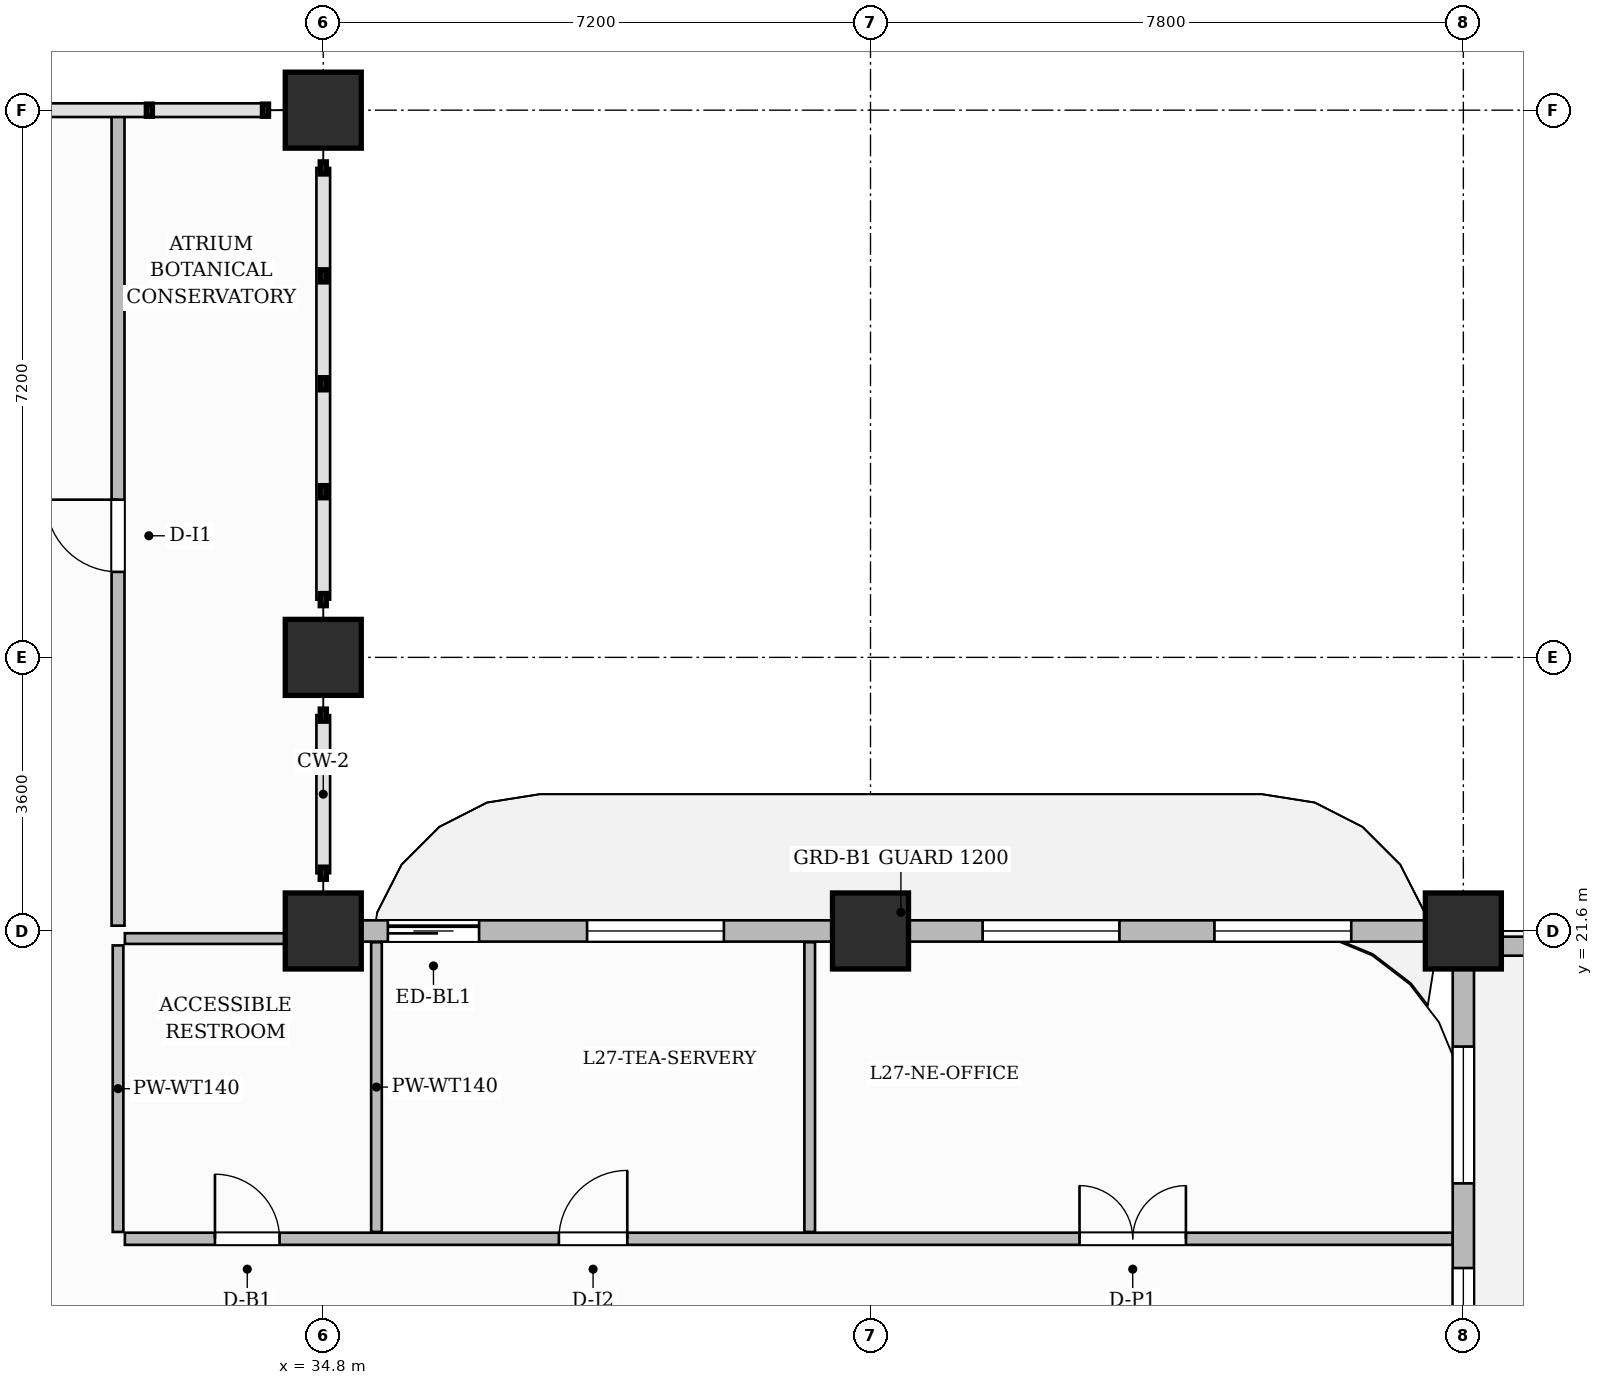
"""IFC4 building model, lengths in metres.
Left out: names, types, materials, properties, quantities, classifications, styles, units other than length and angle.
Written with IfcOpenShell. Run it as: python <this file> out.ifc"""

import sys

from ifc_helpers import new_model, si_unit, direction, frame, frame_2d, origin, origin_2d, place, context, subcontext, project, spatial, rectangle, extrude, source, transform, mapped, element, fill, save


model = new_model("IFC4")
c1 = context("Model", 3, precision=1e-05, world=origin(), true_north=direction((0.0, 1.0)))
c2 = subcontext(c1, "Body", "Model", "MODEL_VIEW")
j1 = project(units=[si_unit("LENGTHUNIT", "METRE"), si_unit("PLANEANGLEUNIT", "RADIAN")], contexts=[c1])
p1 = place(None, origin())
s1 = spatial("IfcSite", under=j1, at=p1, CompositionType="ELEMENT")
p2 = place(p1, origin())
s2 = spatial("IfcBuilding", under=s1, at=p2, CompositionType="ELEMENT")
p3 = place(p2, frame((0.0, 0.0, 111.8)))
s3 = spatial("IfcBuildingStorey", under=s2, at=p3, CompositionType="ELEMENT", Elevation=111.8)
m1 = source(origin(), c2, "Body", "SweptSolid", [
    extrude(rectangle(XDim=1.0, YDim=1.0, at=origin_2d()), origin(), (0.0, 0.0, 1.0), 3.7),
])
for number, where, z_axis, x_axis in (
    (1, (34.8, 21.6, 0.0), (0.0, 0.0, 1.0), (1.0, 0.0, 0.0)),
    (2, (34.8, 25.2, 0.0), (0.0, 0.0, 1.0), (1.0, 0.0, 0.0)),
    (3, (34.8, 32.4, 0.0), (0.0, 0.0, 1.0), (1.0, 0.0, 0.0)),
    (4, (42.0, 21.6, 0.0), (0.0, 0.0, 1.0), (1.0, 0.0, 0.0)),
    (5, (49.8, 21.6, 0.0), (0.0, 0.0, 1.0), (1.0, 0.0, 0.0)),
):
    element("IfcColumn", number, at=place(p3, frame(where, z_axis=z_axis, x_axis=x_axis)), inside=s3, PredefinedType="COLUMN", context=c2, shape_type="MappedRepresentation", body=[
        mapped(m1, transform((0.0, 0.0, 0.0), scale=1.0)),
    ])
p4 = place(p3, frame((32.19, 17.55, 0.0), z_axis=(0.0, 0.0, 1.0), x_axis=(1.0, 0.0, 0.0)))
e6 = element("IfcWall", 6, at=p4, inside=s3, PredefinedType="PARTITIONING", context=c2, shape_type="SweptSolid", body=[
    extrude(rectangle(XDim=17.47, YDim=0.16, at=frame_2d((8.735, 0.0))), origin(), (0.0, 0.0, 1.0), 3.45),
])
p5 = place(p4, frame((1.185, 0.0, 0.0)))
e7 = element("IfcOpeningElement", 7, at=p5, cuts=e6, PredefinedType="OPENING", context=c2, shape_type="SweptSolid", body=[
    extrude(rectangle(XDim=0.85, YDim=2.1, at=frame_2d((0.425, 1.05))), frame((0.0, 0.09, 0.0), z_axis=(0.0, -1.0, 0.0), x_axis=(1.0, 0.0, 0.0)), (0.0, 0.0, 1.0), 0.18),
])
p6 = place(p4, frame((5.71, 0.0, 0.0)))
e8 = element("IfcOpeningElement", 8, at=p6, cuts=e6, PredefinedType="OPENING", context=c2, shape_type="SweptSolid", body=[
    extrude(rectangle(XDim=0.9, YDim=2.15, at=frame_2d((0.45, 1.075))), frame((0.0, 0.09, 0.0), z_axis=(0.0, -1.0, 0.0), x_axis=(1.0, 0.0, 0.0)), (0.0, 0.0, 1.0), 0.18),
])
p7 = place(p4, frame((12.56, 0.0, 0.0)))
e9 = element("IfcOpeningElement", 9, at=p7, cuts=e6, PredefinedType="OPENING", context=c2, shape_type="SweptSolid", body=[
    extrude(rectangle(XDim=1.4, YDim=2.35, at=frame_2d((0.7, 1.175))), frame((0.0, 0.09, 0.0), z_axis=(0.0, -1.0, 0.0), x_axis=(1.0, 0.0, 0.0)), (0.0, 0.0, 1.0), 0.18),
])
p8 = place(p3, frame((32.1, 17.64, 0.0), z_axis=(0.0, 0.0, 1.0), x_axis=(0.0, 1.0, 0.0)))
e10 = element("IfcWall", 10, at=p8, inside=s3, PredefinedType="PARTITIONING", context=c2, shape_type="SweptSolid", body=[
    extrude(rectangle(XDim=3.77, YDim=0.14, at=frame_2d((1.885, 0.0))), origin(), (0.0, 0.0, 1.0), 3.45),
])
for number, where, z_axis, x_axis in (
    (11, (35.5, 17.64, 0.0), (0.0, 0.0, 1.0), (0.0, 1.0, 0.0)),
    (12, (41.2, 17.64, 0.0), (0.0, 0.0, 1.0), (0.0, 1.0, 0.0)),
):
    element("IfcWall", number, at=place(p3, frame(where, z_axis=z_axis, x_axis=x_axis)), inside=s3, PredefinedType="PARTITIONING", context=c2, shape_type="SweptSolid", body=[
        extrude(rectangle(XDim=3.812, YDim=0.14, at=frame_2d((1.906, 0.0))), origin(), (0.0, 0.0, 1.0), 3.45),
    ])
p9 = place(p3, frame((32.19, 21.5, 0.0), z_axis=(0.0, 0.0, 1.0), x_axis=(1.0, 0.0, 0.0)))
e13 = element("IfcWall", 13, at=p9, inside=s3, PredefinedType="PARTITIONING", context=c2, shape_type="SweptSolid", body=[
    extrude(rectangle(XDim=2.42, YDim=0.14, at=frame_2d((1.21, 0.0))), origin(), (0.0, 0.0, 1.0), 2.935),
])
p10 = place(p3, frame((32.1, 21.67, 0.0), z_axis=(0.0, 0.0, 1.0), x_axis=(0.0, 1.0, 0.0)))
e14 = element("IfcWall", 14, at=p10, inside=s3, PredefinedType="PARTITIONING", context=c2, shape_type="SweptSolid", body=[
    extrude(rectangle(XDim=10.702, YDim=0.17, at=frame_2d((5.351, 0.0))), origin(), (0.0, 0.0, 1.0), 3.45),
])
p11 = place(p10, frame((4.655, 0.0, 0.0)))
e15 = element("IfcOpeningElement", 15, at=p11, cuts=e14, PredefinedType="OPENING", context=c2, shape_type="SweptSolid", body=[
    extrude(rectangle(XDim=0.95, YDim=2.15, at=frame_2d((0.475, 1.075))), frame((0.0, 0.095, 0.0), z_axis=(0.0, -1.0, 0.0), x_axis=(1.0, 0.0, 0.0)), (0.0, 0.0, 1.0), 0.19),
])
p12 = place(p3, frame((49.8, 14.62, 0.0), z_axis=(0.0, 0.0, 1.0), x_axis=(0.0, 1.0, 0.0)))
e16 = element("IfcWall", 16, at=p12, inside=s3, PredefinedType="SOLIDWALL", context=c2, shape_type="SweptSolid", body=[
    extrude(rectangle(XDim=6.93, YDim=0.28, at=frame_2d((3.465, 0.0))), origin(), (0.0, 0.0, 1.0), 2.935),
])
p13 = place(p12, frame((0.745, 0.0, 0.8)))
e17 = element("IfcOpeningElement", 17, at=p13, cuts=e16, PredefinedType="OPENING", context=c2, shape_type="SweptSolid", body=[
    extrude(rectangle(XDim=1.8, YDim=1.85, at=frame_2d((0.9, 0.925))), frame((0.0, 0.15, 0.0), z_axis=(0.0, -1.0, 0.0), x_axis=(1.0, 0.0, 0.0)), (0.0, 0.0, 1.0), 0.3),
])
p14 = place(p12, frame((3.659, 0.0, 0.8)))
e18 = element("IfcOpeningElement", 18, at=p14, cuts=e16, PredefinedType="OPENING", context=c2, shape_type="SweptSolid", body=[
    extrude(rectangle(XDim=1.8, YDim=1.85, at=frame_2d((0.9, 0.925))), frame((0.0, 0.15, 0.0), z_axis=(0.0, -1.0, 0.0), x_axis=(1.0, 0.0, 0.0)), (0.0, 0.0, 1.0), 0.3),
])
p15 = place(p3, frame((34.8, 21.6, 0.0), z_axis=(0.0, 0.0, 1.0), x_axis=(1.0, 0.0, 0.0)))
e19 = element("IfcWall", 19, at=p15, inside=s3, PredefinedType="SOLIDWALL", context=c2, shape_type="SweptSolid", body=[
    extrude(rectangle(XDim=15.0, YDim=0.28, at=frame_2d((7.5, 0.0))), origin(), (0.0, 0.0, 1.0), 2.935),
])
p16 = place(p15, frame((0.85, 0.0, 0.0)))
e20 = element("IfcOpeningElement", 20, at=p16, cuts=e19, PredefinedType="OPENING", context=c2, shape_type="SweptSolid", body=[
    extrude(rectangle(XDim=1.2, YDim=2.2, at=frame_2d((0.6, 1.1))), frame((0.0, 0.15, 0.0), z_axis=(0.0, -1.0, 0.0), x_axis=(1.0, 0.0, 0.0)), (0.0, 0.0, 1.0), 0.3),
])
p17 = place(p15, frame((3.471, 0.0, 0.8)))
e21 = element("IfcOpeningElement", 21, at=p17, cuts=e19, PredefinedType="OPENING", context=c2, shape_type="SweptSolid", body=[
    extrude(rectangle(XDim=1.8, YDim=1.85, at=frame_2d((0.9, 0.925))), frame((0.0, 0.15, 0.0), z_axis=(0.0, -1.0, 0.0), x_axis=(1.0, 0.0, 0.0)), (0.0, 0.0, 1.0), 0.3),
])
p18 = place(p15, frame((8.675, 0.0, 0.8)))
e22 = element("IfcOpeningElement", 22, at=p18, cuts=e19, PredefinedType="OPENING", context=c2, shape_type="SweptSolid", body=[
    extrude(rectangle(XDim=1.8, YDim=1.85, at=frame_2d((0.9, 0.925))), frame((0.0, 0.15, 0.0), z_axis=(0.0, -1.0, 0.0), x_axis=(1.0, 0.0, 0.0)), (0.0, 0.0, 1.0), 0.3),
])
p19 = place(p15, frame((11.725, 0.0, 0.8)))
e23 = element("IfcOpeningElement", 23, at=p19, cuts=e19, PredefinedType="OPENING", context=c2, shape_type="SweptSolid", body=[
    extrude(rectangle(XDim=1.8, YDim=1.85, at=frame_2d((0.9, 0.925))), frame((0.0, 0.15, 0.0), z_axis=(0.0, -1.0, 0.0), x_axis=(1.0, 0.0, 0.0)), (0.0, 0.0, 1.0), 0.3),
])
p20 = place(p3, frame((50.06, 21.4, 0.0), z_axis=(0.0, 0.0, 1.0), x_axis=(1.0, 0.0, 0.0)))
e24 = element("IfcWall", 24, at=p20, inside=s3, PredefinedType="PARAPET", context=c2, shape_type="SweptSolid", body=[
    extrude(rectangle(XDim=5.127, YDim=0.25, at=frame_2d((2.563, 0.0))), origin(), (0.0, 0.0, 1.0), 0.95),
])
m2 = source(origin(), c2, "Body", "SweptSolid", [
    extrude(rectangle(XDim=0.85, YDim=2.1, at=frame_2d((0.425, 1.05))), frame((0.0, 0.025, 0.0), z_axis=(0.0, -1.0, 0.0), x_axis=(1.0, 0.0, 0.0)), (0.0, 0.0, 1.0), 0.05),
])
p21 = place(p5, origin())
e25 = element("IfcDoor", 25, at=p21, inside=s3, OperationType="SINGLE_SWING_LEFT", PredefinedType="DOOR", context=c2, shape_type="MappedRepresentation", body=[
    mapped(m2, transform((0.0, 0.0, 0.0), scale=1.0)),
])
fill(e7, e25)
m3 = source(origin(), c2, "Body", "SweptSolid", [
    extrude(rectangle(XDim=0.9, YDim=2.15, at=frame_2d((0.45, 1.075))), frame((0.0, 0.025, 0.0), z_axis=(0.0, -1.0, 0.0), x_axis=(1.0, 0.0, 0.0)), (0.0, 0.0, 1.0), 0.05),
])
p22 = place(p6, origin())
e26 = element("IfcDoor", 26, at=p22, inside=s3, OperationType="SINGLE_SWING_RIGHT", PredefinedType="DOOR", context=c2, shape_type="MappedRepresentation", body=[
    mapped(m3, transform((0.0, 0.0, 0.0), scale=1.0)),
])
fill(e8, e26)
m4 = source(origin(), c2, "Body", "SweptSolid", [
    extrude(rectangle(XDim=1.4, YDim=2.35, at=frame_2d((0.7, 1.175))), frame((0.0, 0.025, 0.0), z_axis=(0.0, -1.0, 0.0), x_axis=(1.0, 0.0, 0.0)), (0.0, 0.0, 1.0), 0.05),
])
p23 = place(p7, origin())
e27 = element("IfcDoor", 27, at=p23, inside=s3, OperationType="DOUBLE_DOOR_SINGLE_SWING", PredefinedType="DOOR", context=c2, shape_type="MappedRepresentation", body=[
    mapped(m4, transform((0.0, 0.0, 0.0), scale=1.0)),
])
fill(e9, e27)
m5 = source(origin(), c2, "Body", "SweptSolid", [
    extrude(rectangle(XDim=0.95, YDim=2.15, at=frame_2d((0.475, 1.075))), frame((0.0, 0.025, 0.0), z_axis=(0.0, -1.0, 0.0), x_axis=(1.0, 0.0, 0.0)), (0.0, 0.0, 1.0), 0.05),
])
p24 = place(p11, origin())
e28 = element("IfcDoor", 28, at=p24, inside=s3, OperationType="SINGLE_SWING_RIGHT", PredefinedType="DOOR", context=c2, shape_type="MappedRepresentation", body=[
    mapped(m5, transform((0.0, 0.0, 0.0), scale=1.0)),
])
fill(e15, e28)
m6 = source(origin(), c2, "Body", "SweptSolid", [
    extrude(rectangle(XDim=1.2, YDim=2.2, at=frame_2d((0.6, 1.1))), frame((0.0, 0.025, 0.0), z_axis=(0.0, -1.0, 0.0), x_axis=(1.0, 0.0, 0.0)), (0.0, 0.0, 1.0), 0.05),
])
p25 = place(p16, origin())
e29 = element("IfcDoor", 29, at=p25, inside=s3, OperationType="SLIDING_TO_LEFT", PredefinedType="DOOR", context=c2, shape_type="MappedRepresentation", body=[
    mapped(m6, transform((0.0, 0.0, 0.0), scale=1.0)),
])
fill(e20, e29)
m7 = source(origin(), c2, "Body", "SweptSolid", [
    extrude(rectangle(XDim=1.8, YDim=1.85, at=frame_2d((0.9, 0.925))), frame((0.0, 0.03, 0.0), z_axis=(0.0, -1.0, 0.0), x_axis=(1.0, 0.0, 0.0)), (0.0, 0.0, 1.0), 0.06),
])
p26 = place(p13, origin())
e30 = element("IfcWindow", 30, at=p26, inside=s3, PartitioningType="DOUBLE_PANEL_VERTICAL", PredefinedType="WINDOW", context=c2, shape_type="MappedRepresentation", body=[
    mapped(m7, transform((0.0, 0.0, 0.0), scale=1.0)),
])
fill(e17, e30)
p27 = place(p14, origin())
e31 = element("IfcWindow", 31, at=p27, inside=s3, PartitioningType="DOUBLE_PANEL_VERTICAL", PredefinedType="WINDOW", context=c2, shape_type="MappedRepresentation", body=[
    mapped(m7, transform((0.0, 0.0, 0.0), scale=1.0)),
])
fill(e18, e31)
p28 = place(p17, origin())
e32 = element("IfcWindow", 32, at=p28, inside=s3, PartitioningType="DOUBLE_PANEL_VERTICAL", PredefinedType="WINDOW", context=c2, shape_type="MappedRepresentation", body=[
    mapped(m7, transform((0.0, 0.0, 0.0), scale=1.0)),
])
fill(e21, e32)
p29 = place(p18, origin())
e33 = element("IfcWindow", 33, at=p29, inside=s3, PartitioningType="DOUBLE_PANEL_VERTICAL", PredefinedType="WINDOW", context=c2, shape_type="MappedRepresentation", body=[
    mapped(m7, transform((0.0, 0.0, 0.0), scale=1.0)),
])
fill(e22, e33)
p30 = place(p19, origin())
e34 = element("IfcWindow", 34, at=p30, inside=s3, PartitioningType="DOUBLE_PANEL_VERTICAL", PredefinedType="WINDOW", context=c2, shape_type="MappedRepresentation", body=[
    mapped(m7, transform((0.0, 0.0, 0.0), scale=1.0)),
])
fill(e23, e34)
save(model, sys.argv[1])
